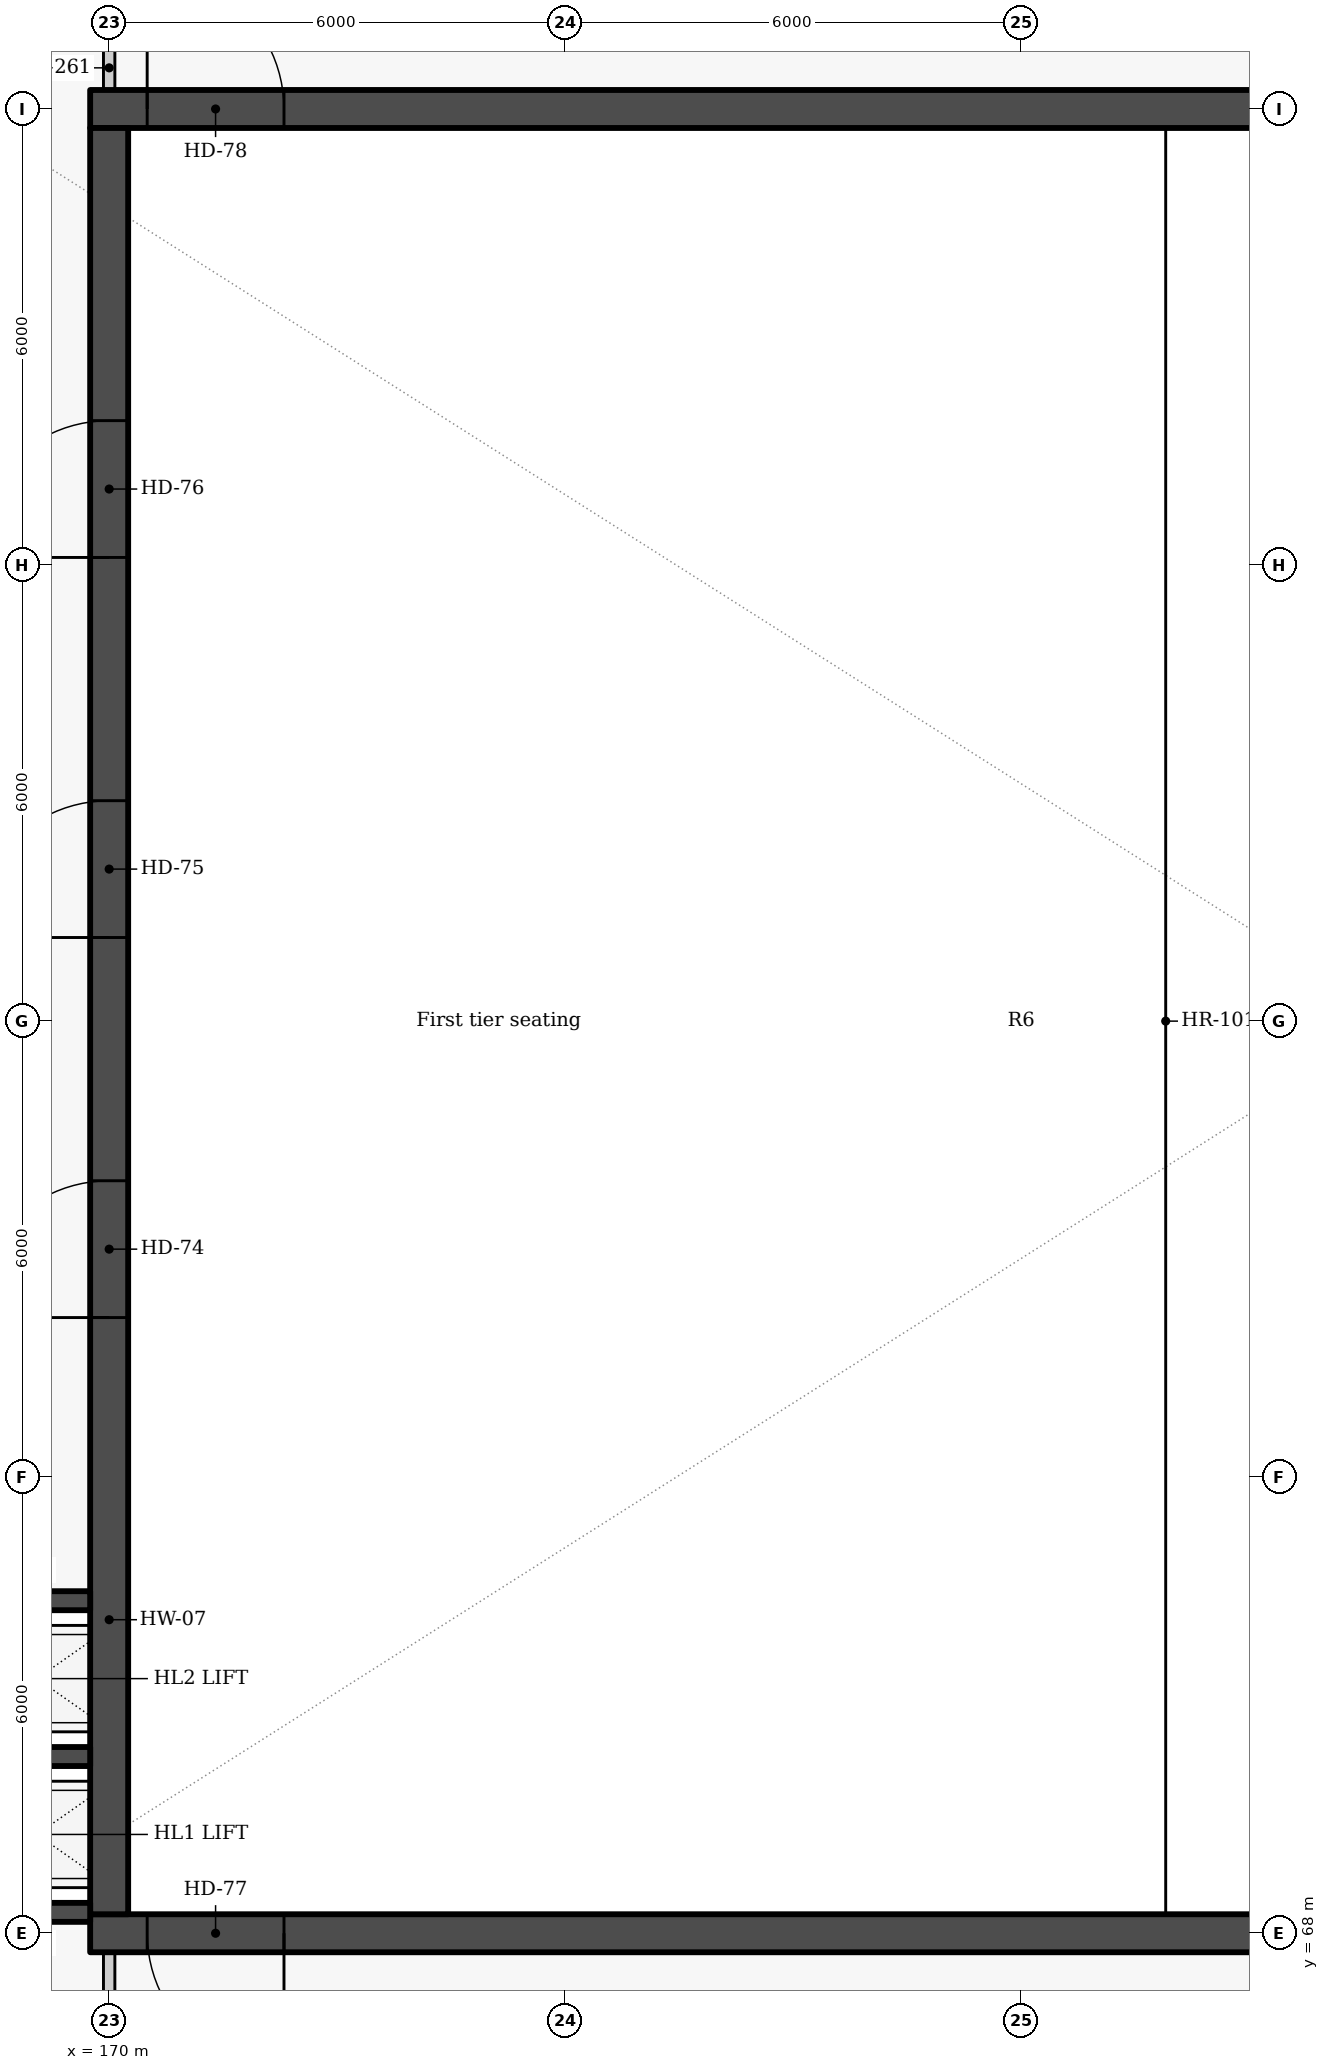
"""IFC4 building model, lengths in metres.
Left out: names, types, materials, properties, quantities, classifications, styles, units other than length and angle.
Written with IfcOpenShell. Run it as: python <this file> out.ifc"""

import sys

from ifc_helpers import new_model, si_unit, direction, frame, frame_2d, origin, place, context, subcontext, project, spatial, rectangle, extrude, element, fill, save


model = new_model("IFC4")
c1 = context("Model", 3, precision=1e-05, world=origin(), true_north=direction((0.0, 1.0)))
c2 = subcontext(c1, "Body", "Model", "MODEL_VIEW")
j1 = project(units=[si_unit("LENGTHUNIT", "METRE"), si_unit("PLANEANGLEUNIT", "RADIAN")], contexts=[c1])
p1 = place(None, origin())
s1 = spatial("IfcSite", under=j1, at=p1, CompositionType="ELEMENT")
p2 = place(p1, origin())
s2 = spatial("IfcBuilding", under=s1, at=p2, CompositionType="ELEMENT")
p3 = place(p2, frame((0.0, 0.0, 6.6)))
s3 = spatial("IfcBuildingStorey", under=s2, at=p3, CompositionType="ELEMENT", Elevation=6.6)
p4 = place(p3, frame((206.25, 68.0, 0.0), z_axis=(0.0, 0.0, 1.0), x_axis=(-1.0, 0.0, 0.0)))
e1 = element("IfcWall", 1, at=p4, inside=s3, PredefinedType="SHEAR", context=c2, shape_type="SweptSolid", body=[
    extrude(rectangle(XDim=36.5, YDim=0.5, at=frame_2d((18.25, 0.0))), origin(), (0.0, 0.0, 1.0), 4.8),
])
p5 = place(p4, frame((33.95, 0.0, 0.0)))
e2 = element("IfcOpeningElement", 2, at=p5, cuts=e1, PredefinedType="OPENING", context=c2, shape_type="SweptSolid", body=[
    extrude(rectangle(XDim=1.8, YDim=2.4, at=frame_2d((0.9, 1.2))), frame((0.0, 0.26, 0.0), z_axis=(0.0, -1.0, 0.0), x_axis=(1.0, 0.0, 0.0)), (0.0, 0.0, 1.0), 0.52),
])
p6 = place(p3, frame((169.75, 92.0, 0.0), z_axis=(0.0, 0.0, 1.0), x_axis=(1.0, 0.0, 0.0)))
e3 = element("IfcWall", 3, at=p6, inside=s3, PredefinedType="SHEAR", context=c2, shape_type="SweptSolid", body=[
    extrude(rectangle(XDim=36.5, YDim=0.5, at=frame_2d((18.25, 0.0))), origin(), (0.0, 0.0, 1.0), 4.8),
])
p7 = place(p6, frame((0.75, 0.0, 0.0)))
e4 = element("IfcOpeningElement", 4, at=p7, cuts=e3, PredefinedType="OPENING", context=c2, shape_type="SweptSolid", body=[
    extrude(rectangle(XDim=1.8, YDim=2.4, at=frame_2d((0.9, 1.2))), frame((0.0, 0.26, 0.0), z_axis=(0.0, -1.0, 0.0), x_axis=(1.0, 0.0, 0.0)), (0.0, 0.0, 1.0), 0.52),
])
p8 = place(p3, frame((170.0, 68.25, 0.0), z_axis=(0.0, 0.0, 1.0), x_axis=(0.0, 1.0, 0.0)))
e5 = element("IfcWall", 5, at=p8, inside=s3, PredefinedType="SHEAR", context=c2, shape_type="SweptSolid", body=[
    extrude(rectangle(XDim=23.5, YDim=0.5, at=frame_2d((11.75, 0.0))), origin(), (0.0, 0.0, 1.0), 4.8),
])
p9 = place(p8, frame((7.85, 0.0, 0.0)))
e6 = element("IfcOpeningElement", 6, at=p9, cuts=e5, PredefinedType="OPENING", context=c2, shape_type="SweptSolid", body=[
    extrude(rectangle(XDim=1.8, YDim=2.4, at=frame_2d((0.9, 1.2))), frame((0.0, 0.26, 0.0), z_axis=(0.0, -1.0, 0.0), x_axis=(1.0, 0.0, 0.0)), (0.0, 0.0, 1.0), 0.52),
])
p10 = place(p8, frame((12.85, 0.0, 0.0)))
e7 = element("IfcOpeningElement", 7, at=p10, cuts=e5, PredefinedType="OPENING", context=c2, shape_type="SweptSolid", body=[
    extrude(rectangle(XDim=1.8, YDim=2.4, at=frame_2d((0.9, 1.2))), frame((0.0, 0.26, 0.0), z_axis=(0.0, -1.0, 0.0), x_axis=(1.0, 0.0, 0.0)), (0.0, 0.0, 1.0), 0.52),
])
p11 = place(p8, frame((17.85, 0.0, 0.0)))
e8 = element("IfcOpeningElement", 8, at=p11, cuts=e5, PredefinedType="OPENING", context=c2, shape_type="SweptSolid", body=[
    extrude(rectangle(XDim=1.8, YDim=2.4, at=frame_2d((0.9, 1.2))), frame((0.0, 0.26, 0.0), z_axis=(0.0, -1.0, 0.0), x_axis=(1.0, 0.0, 0.0)), (0.0, 0.0, 1.0), 0.52),
])
for number, where, z_axis, x_axis in (
    (9, (167.725, 70.325, 0.0), (0.0, 0.0, 1.0), (1.0, 0.0, 0.0)),
    (10, (169.75, 72.375, 0.0), (0.0, 0.0, 1.0), (-1.0, 0.0, 0.0)),
    (11, (167.725, 68.275, 0.0), (0.0, 0.0, 1.0), (1.0, 0.0, 0.0)),
):
    element("IfcWall", number, at=place(p3, frame(where, z_axis=z_axis, x_axis=x_axis)), inside=s3, PredefinedType="SOLIDWALL", context=c2, shape_type="SweptSolid", body=[
        extrude(rectangle(XDim=2.025, YDim=0.25, at=frame_2d((1.012, 0.0))), origin(), (0.0, 0.0, 1.0), 4.8),
    ])
p12 = place(p3, frame((170.0, 67.75, 0.0), z_axis=(0.0, 0.0, 1.0), x_axis=(0.0, -1.0, 0.0)))
e12 = element("IfcWall", 12, at=p12, inside=s3, PredefinedType="PARTITIONING", context=c2, shape_type="SweptSolid", body=[
    extrude(rectangle(XDim=2.965, YDim=0.15, at=frame_2d((1.482, 0.0))), origin(), (0.0, 0.0, 1.0), 4.45),
])
p13 = place(p12, frame((0.683, 0.0, 0.0)))
e13 = element("IfcOpeningElement", 13, at=p13, cuts=e12, PredefinedType="OPENING", context=c2, shape_type="SweptSolid", body=[
    extrude(rectangle(XDim=1.6, YDim=2.1, at=frame_2d((0.8, 1.05))), frame((0.0, 0.085, 0.0), z_axis=(0.0, -1.0, 0.0), x_axis=(1.0, 0.0, 0.0)), (0.0, 0.0, 1.0), 0.17),
])
p14 = place(p3, frame((170.0, 95.215, 0.0), z_axis=(0.0, 0.0, 1.0), x_axis=(0.0, -1.0, 0.0)))
e14 = element("IfcWall", 14, at=p14, inside=s3, PredefinedType="PARTITIONING", context=c2, shape_type="SweptSolid", body=[
    extrude(rectangle(XDim=2.965, YDim=0.15, at=frame_2d((1.482, 0.0))), origin(), (0.0, 0.0, 1.0), 4.45),
])
p15 = place(p14, frame((0.683, 0.0, 0.0)))
e15 = element("IfcOpeningElement", 15, at=p15, cuts=e14, PredefinedType="OPENING", context=c2, shape_type="SweptSolid", body=[
    extrude(rectangle(XDim=1.6, YDim=2.1, at=frame_2d((0.8, 1.05))), frame((0.0, 0.085, 0.0), z_axis=(0.0, -1.0, 0.0), x_axis=(1.0, 0.0, 0.0)), (0.0, 0.0, 1.0), 0.17),
])
p16 = place(p9, origin())
e16 = element("IfcDoor", 16, at=p16, inside=s3, OperationType="DOUBLE_DOOR_SINGLE_SWING", PredefinedType="DOOR", context=c2, shape_type="SweptSolid", body=[
    extrude(rectangle(XDim=1.8, YDim=2.4, at=frame_2d((0.9, 1.2))), frame((0.0, 0.025, 0.0), z_axis=(0.0, -1.0, 0.0), x_axis=(1.0, 0.0, 0.0)), (0.0, 0.0, 1.0), 0.05),
])
fill(e6, e16)
p17 = place(p10, origin())
e17 = element("IfcDoor", 17, at=p17, inside=s3, OperationType="DOUBLE_DOOR_SINGLE_SWING", PredefinedType="DOOR", context=c2, shape_type="SweptSolid", body=[
    extrude(rectangle(XDim=1.8, YDim=2.4, at=frame_2d((0.9, 1.2))), frame((0.0, 0.025, 0.0), z_axis=(0.0, -1.0, 0.0), x_axis=(1.0, 0.0, 0.0)), (0.0, 0.0, 1.0), 0.05),
])
fill(e7, e17)
p18 = place(p11, origin())
e18 = element("IfcDoor", 18, at=p18, inside=s3, OperationType="DOUBLE_DOOR_SINGLE_SWING", PredefinedType="DOOR", context=c2, shape_type="SweptSolid", body=[
    extrude(rectangle(XDim=1.8, YDim=2.4, at=frame_2d((0.9, 1.2))), frame((0.0, 0.025, 0.0), z_axis=(0.0, -1.0, 0.0), x_axis=(1.0, 0.0, 0.0)), (0.0, 0.0, 1.0), 0.05),
])
fill(e8, e18)
p19 = place(p5, origin())
e19 = element("IfcDoor", 19, at=p19, inside=s3, OperationType="DOUBLE_DOOR_SINGLE_SWING", PredefinedType="DOOR", context=c2, shape_type="SweptSolid", body=[
    extrude(rectangle(XDim=1.8, YDim=2.4, at=frame_2d((0.9, 1.2))), frame((0.0, 0.025, 0.0), z_axis=(0.0, -1.0, 0.0), x_axis=(1.0, 0.0, 0.0)), (0.0, 0.0, 1.0), 0.05),
])
fill(e2, e19)
p20 = place(p7, origin())
e20 = element("IfcDoor", 20, at=p20, inside=s3, OperationType="DOUBLE_DOOR_SINGLE_SWING", PredefinedType="DOOR", context=c2, shape_type="SweptSolid", body=[
    extrude(rectangle(XDim=1.8, YDim=2.4, at=frame_2d((0.9, 1.2))), frame((0.0, 0.025, 0.0), z_axis=(0.0, -1.0, 0.0), x_axis=(1.0, 0.0, 0.0)), (0.0, 0.0, 1.0), 0.05),
])
fill(e4, e20)
save(model, sys.argv[1])
